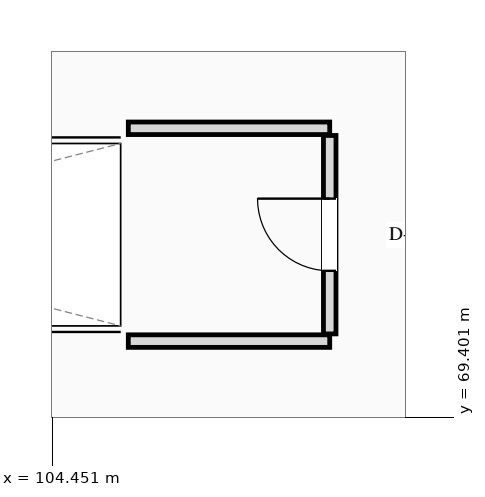
"""IFC4 building model, lengths in metres.
Left out: names, types, materials, properties, quantities, classifications, styles, units other than length and angle.
Written with IfcOpenShell. Run it as: python <this file> out.ifc"""

import sys

from ifc_helpers import new_model, si_unit, direction, frame, frame_2d, origin, place, context, subcontext, project, spatial, rectangle, extrude, element, fill, save


model = new_model("IFC4")
c1 = context("Model", 3, precision=1e-05, world=origin(), true_north=direction((0.0, 1.0)))
c2 = subcontext(c1, "Body", "Model", "MODEL_VIEW")
j1 = project(units=[si_unit("LENGTHUNIT", "METRE"), si_unit("PLANEANGLEUNIT", "RADIAN")], contexts=[c1])
p1 = place(None, origin())
s1 = spatial("IfcSite", under=j1, at=p1, CompositionType="ELEMENT")
p2 = place(p1, origin())
s2 = spatial("IfcBuilding", under=s1, at=p2, CompositionType="ELEMENT")
p3 = place(p2, frame((0.0, 0.0, 5.4)))
s3 = spatial("IfcBuildingStorey", under=s2, at=p3, CompositionType="ELEMENT", Elevation=5.4)
p4 = place(p3, frame((105.45, 70.4, 0.0), z_axis=(0.0, 0.0, 1.0), x_axis=(1.0, 0.0, 0.0)))
e1 = element("IfcWall", 1, at=p4, inside=s3, PredefinedType="PARTITIONING", context=c2, shape_type="SweptSolid", body=[
    extrude(rectangle(XDim=2.65, YDim=0.165, at=frame_2d((1.325, 0.0))), origin(), (0.0, 0.0, 1.0), 4.703),
])
p5 = place(p3, frame((105.45, 73.2, 0.0), z_axis=(0.0, 0.0, 1.0), x_axis=(1.0, 0.0, 0.0)))
e2 = element("IfcWall", 2, at=p5, inside=s3, PredefinedType="PARTITIONING", context=c2, shape_type="SweptSolid", body=[
    extrude(rectangle(XDim=2.65, YDim=0.165, at=frame_2d((1.325, 0.0))), origin(), (0.0, 0.0, 1.0), 5.095),
])
p6 = place(p3, frame((108.1, 70.494, 0.0), z_axis=(0.0, 0.0, 1.0), x_axis=(0.0, 1.0, 0.0)))
e3 = element("IfcWall", 3, at=p6, inside=s3, PredefinedType="PARTITIONING", context=c2, shape_type="SweptSolid", body=[
    extrude(rectangle(XDim=2.611, YDim=0.165, at=frame_2d((1.306, 0.0))), origin(), (0.0, 0.0, 1.0), 4.703),
])
p7 = place(p6, frame((0.83, 0.0, 0.0)))
e4 = element("IfcOpeningElement", 4, at=p7, cuts=e3, PredefinedType="OPENING", context=c2, shape_type="SweptSolid", body=[
    extrude(rectangle(XDim=0.95, YDim=2.15, at=frame_2d((0.475, 1.075))), frame((0.0, 0.093, 0.0), z_axis=(0.0, -1.0, 0.0), x_axis=(1.0, 0.0, 0.0)), (0.0, 0.0, 1.0), 0.185),
])
p8 = place(p7, origin())
e5 = element("IfcDoor", 5, at=p8, inside=s3, OperationType="SINGLE_SWING_RIGHT", PredefinedType="DOOR", context=c2, shape_type="SweptSolid", body=[
    extrude(rectangle(XDim=0.95, YDim=2.15, at=frame_2d((0.475, 1.075))), frame((0.0, 0.025, 0.0), z_axis=(0.0, -1.0, 0.0), x_axis=(1.0, 0.0, 0.0)), (0.0, 0.0, 1.0), 0.05),
])
fill(e4, e5)
save(model, sys.argv[1])
